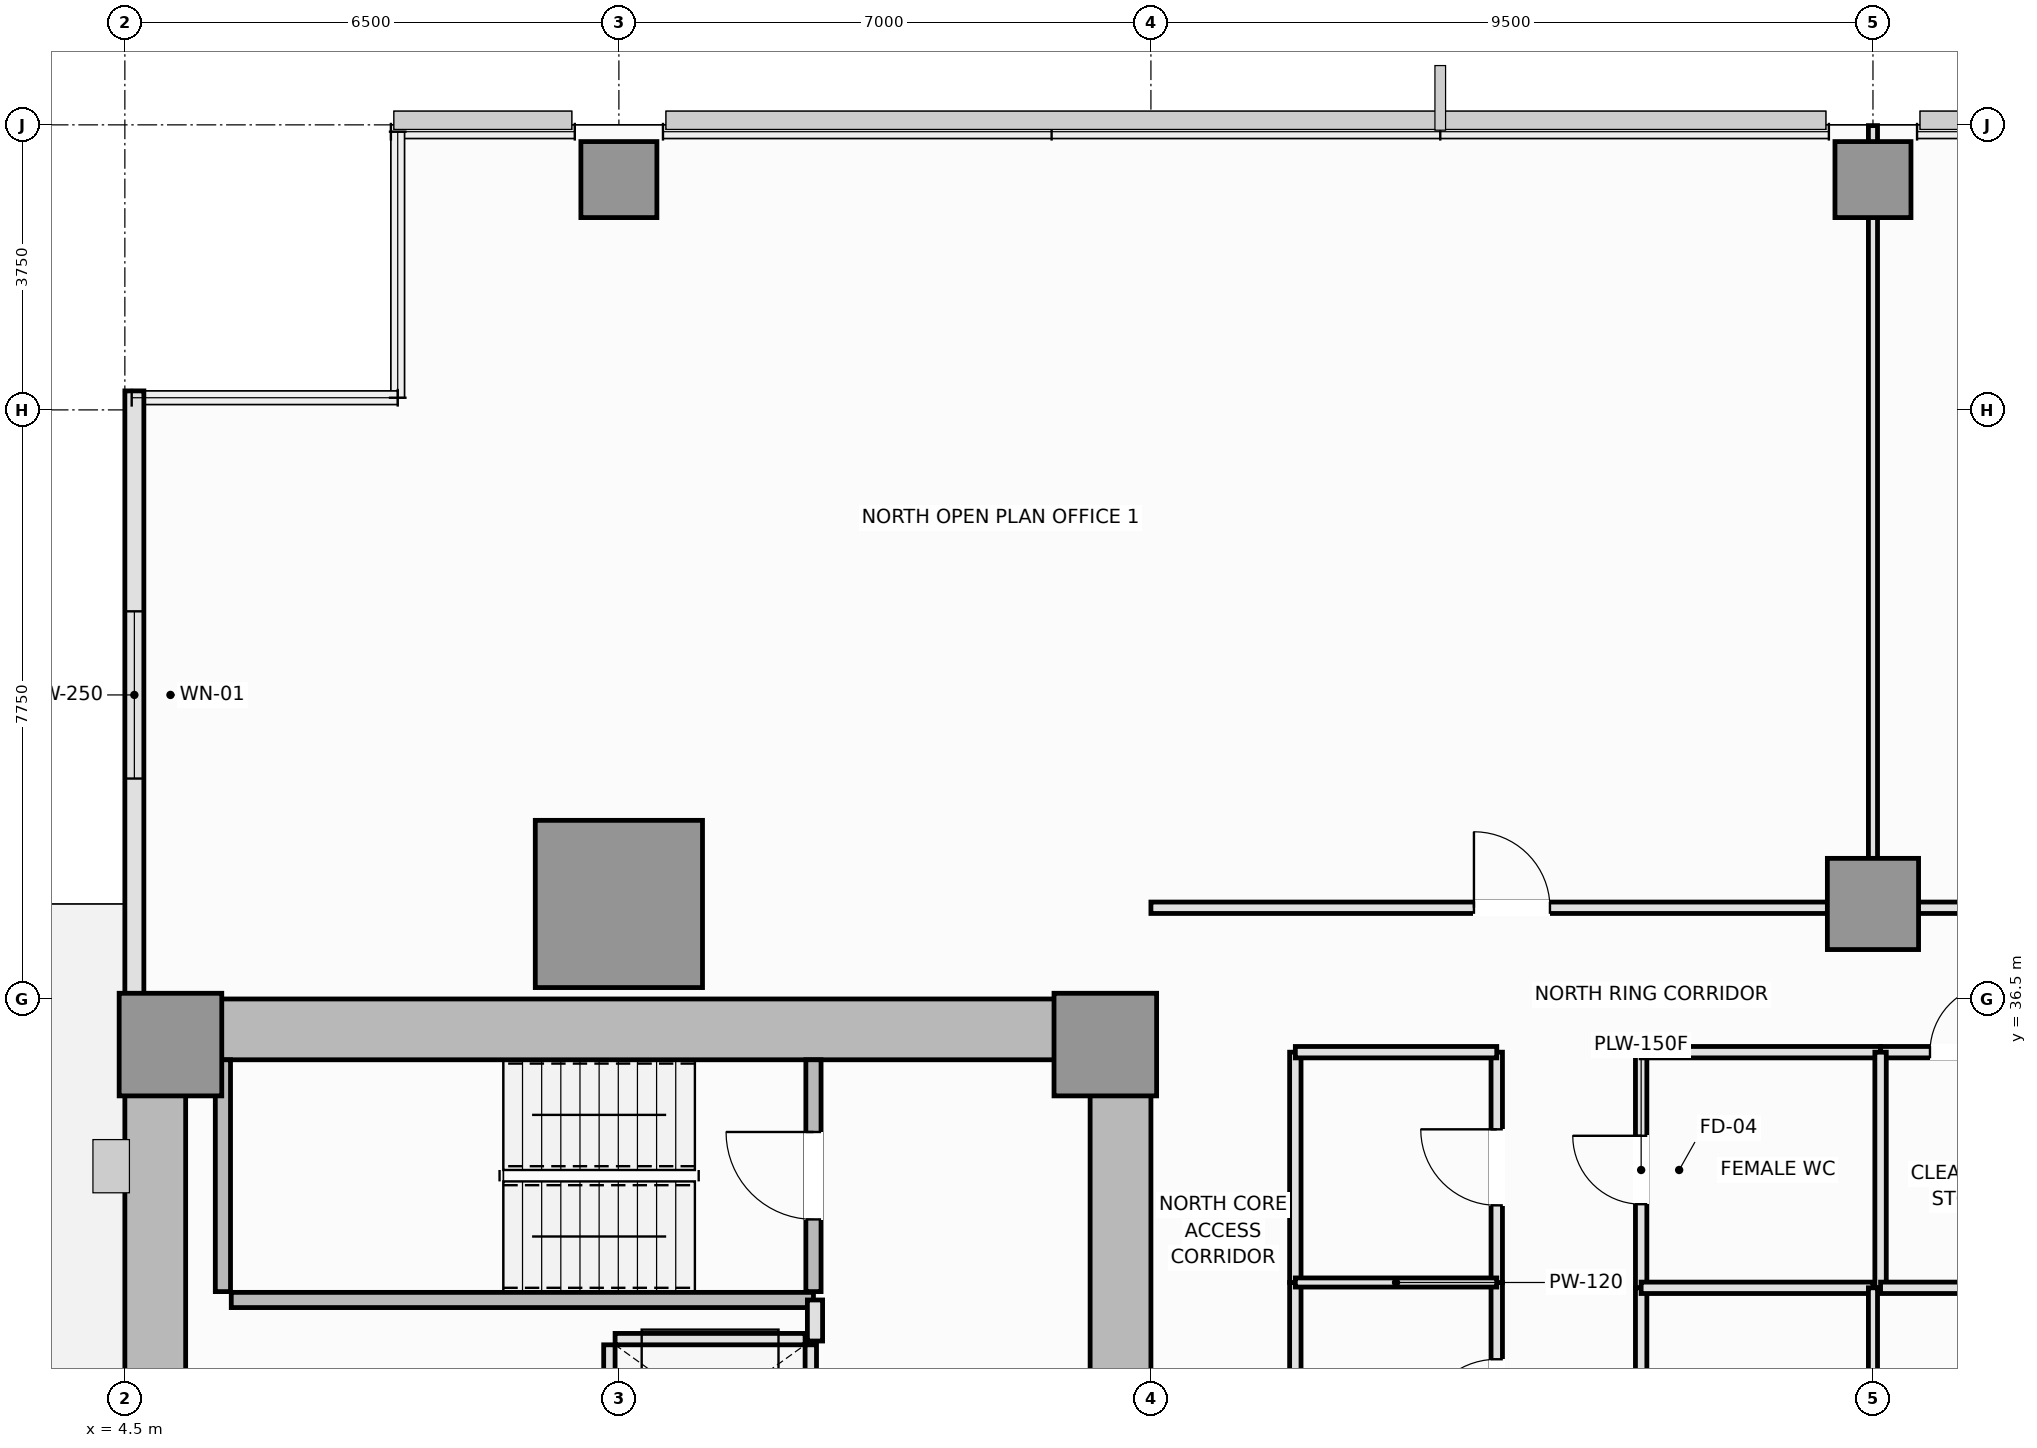
"""IFC4 building model, lengths in metres.
Left out: names, types, materials, properties, quantities, classifications, styles, units other than length and angle.
Written with IfcOpenShell. Run it as: python <this file> out.ifc"""

import sys

from ifc_helpers import new_model, si_unit, direction, frame, frame_2d, origin, origin_2d, place, context, subcontext, project, spatial, rectangle, extrude, element, fill, save


model = new_model("IFC4")
c1 = context("Model", 3, precision=1e-05, world=origin(), true_north=direction((0.0, 1.0)))
c2 = subcontext(c1, "Body", "Model", "MODEL_VIEW")
j1 = project(units=[si_unit("LENGTHUNIT", "METRE"), si_unit("PLANEANGLEUNIT", "RADIAN")], contexts=[c1])
p1 = place(None, origin())
s1 = spatial("IfcSite", under=j1, at=p1, CompositionType="ELEMENT")
p2 = place(p1, origin())
s2 = spatial("IfcBuilding", under=s1, at=p2, CompositionType="ELEMENT")
p3 = place(p2, frame((0.0, 0.0, 25.6)))
s3 = spatial("IfcBuildingStorey", under=s2, at=p3, CompositionType="ELEMENT", Elevation=25.6)
p4 = place(p3, frame((4.5, 36.1, 0.0), z_axis=(0.0, 0.0, 1.0), x_axis=(1.0, 0.0, 0.0)))
e1 = element("IfcWall", 1, at=p4, inside=s3, PredefinedType="SHEAR", context=c2, shape_type="SweptSolid", body=[
    extrude(rectangle(XDim=13.5, YDim=0.8, at=frame_2d((6.75, 0.0))), origin(), (0.0, 0.0, 1.0), 3.55),
])
p5 = place(p3, frame((4.9, 14.8, 0.0), z_axis=(0.0, 0.0, 1.0), x_axis=(0.0, 1.0, 0.0)))
e2 = element("IfcWall", 2, at=p5, inside=s3, PredefinedType="SHEAR", context=c2, shape_type="SweptSolid", body=[
    extrude(rectangle(XDim=20.9, YDim=0.8, at=frame_2d((10.45, 0.0))), origin(), (0.0, 0.0, 1.0), 3.55),
])
p6 = place(p3, frame((17.6, 27.05, 0.0), z_axis=(0.0, 0.0, 1.0), x_axis=(0.0, 1.0, 0.0)))
e3 = element("IfcWall", 3, at=p6, inside=s3, PredefinedType="SHEAR", context=c2, shape_type="SweptSolid", body=[
    extrude(rectangle(XDim=8.65, YDim=0.8, at=frame_2d((4.325, 0.0))), origin(), (0.0, 0.0, 1.0), 3.55),
])
p7 = place(p6, frame((3.45, 0.0, 0.0)))
e4 = element("IfcOpeningElement", 4, at=p7, cuts=e3, PredefinedType="OPENING", context=c2, shape_type="SweptSolid", body=[
    extrude(rectangle(XDim=1.1, YDim=2.15, at=frame_2d((0.55, 1.075))), frame((0.0, 0.41, 0.0), z_axis=(0.0, -1.0, 0.0), x_axis=(1.0, 0.0, 0.0)), (0.0, 0.0, 1.0), 0.82),
])
for number, where, z_axis, x_axis in (
    (5, (5.1, 35.9, 0.0), (0.0, 0.0, 1.0), (1.0, 0.0, 0.0)),
    (6, (17.4, 35.9, 0.0), (0.0, 0.0, 1.0), (1.0, 0.0, 0.0)),
):
    element("IfcColumn", number, at=place(p3, frame(where, z_axis=z_axis, x_axis=x_axis)), inside=s3, PredefinedType="PILASTER", context=c2, shape_type="SweptSolid", body=[
        extrude(rectangle(XDim=1.35, YDim=1.35, at=origin_2d()), origin(), (0.0, 0.0, 1.0), 3.55),
    ])
p8 = place(p3, frame((11.0, 37.75, 0.0), z_axis=(0.0, 0.0, 1.0), x_axis=(1.0, 0.0, 0.0)))
e7 = element("IfcColumn", 7, at=p8, inside=s3, PredefinedType="COLUMN", context=c2, shape_type="SweptSolid", body=[
    extrude(rectangle(XDim=2.2, YDim=2.2, at=origin_2d()), origin(), (0.0, 0.0, 1.0), 3.55),
])
p9 = place(p3, frame((27.5, 37.75, 0.0), z_axis=(0.0, 0.0, 1.0), x_axis=(1.0, 0.0, 0.0)))
e8 = element("IfcColumn", 8, at=p9, inside=s3, PredefinedType="COLUMN", context=c2, shape_type="SweptSolid", body=[
    extrude(rectangle(XDim=1.2, YDim=1.2, at=origin_2d()), origin(), (0.0, 0.0, 1.0), 3.55),
])
for number, where, z_axis, x_axis in (
    (9, (11.0, 47.28, 0.0), (0.0, 0.0, 1.0), (1.0, 0.0, 0.0)),
    (10, (27.5, 47.28, 0.0), (0.0, 0.0, 1.0), (1.0, 0.0, 0.0)),
):
    element("IfcColumn", number, at=place(p3, frame(where, z_axis=z_axis, x_axis=x_axis)), inside=s3, PredefinedType="COLUMN", context=c2, shape_type="SweptSolid", body=[
        extrude(rectangle(XDim=1.0, YDim=1.0, at=origin_2d()), origin(), (0.0, 0.0, 1.0), 3.55),
    ])
p10 = place(p3, frame((4.625, 44.5, 0.0), z_axis=(0.0, 0.0, 1.0), x_axis=(0.0, -1.0, 0.0)))
e11 = element("IfcWall", 11, at=p10, inside=s3, PredefinedType="SOLIDWALL", context=c2, shape_type="SweptSolid", body=[
    extrude(rectangle(XDim=8.0, YDim=0.25, at=frame_2d((4.0, 0.0))), origin(), (0.0, 0.0, 1.0), 3.37),
])
p11 = place(p10, frame((2.9, 0.0, 0.9)))
e12 = element("IfcOpeningElement", 12, at=p11, cuts=e11, PredefinedType="OPENING", context=c2, shape_type="SweptSolid", body=[
    extrude(rectangle(XDim=2.2, YDim=1.8, at=frame_2d((1.1, 0.9))), frame((0.0, 0.135, 0.0), z_axis=(0.0, -1.0, 0.0), x_axis=(1.0, 0.0, 0.0)), (0.0, 0.0, 1.0), 0.27),
])
p12 = place(p3, frame((5.79, 32.65, 0.0), z_axis=(0.0, 0.0, 1.0), x_axis=(0.0, 1.0, 0.0)))
e13 = element("IfcWall", 13, at=p12, inside=s3, PredefinedType="SOLIDWALL", context=c2, shape_type="SweptSolid", body=[
    extrude(rectangle(XDim=3.05, YDim=0.2, at=frame_2d((1.525, 0.0))), origin(), (0.0, 0.0, 1.0), 3.55),
])
p13 = place(p3, frame((5.9, 32.54, 0.0), z_axis=(0.0, 0.0, 1.0), x_axis=(1.0, 0.0, 0.0)))
e14 = element("IfcWall", 14, at=p13, inside=s3, PredefinedType="SOLIDWALL", context=c2, shape_type="SweptSolid", body=[
    extrude(rectangle(XDim=7.66, YDim=0.2, at=frame_2d((3.83, 0.0))), origin(), (0.0, 0.0, 1.0), 3.55),
])
p14 = place(p3, frame((13.56, 32.65, 0.0), z_axis=(0.0, 0.0, 1.0), x_axis=(0.0, 1.0, 0.0)))
e15 = element("IfcWall", 15, at=p14, inside=s3, PredefinedType="SOLIDWALL", context=c2, shape_type="SweptSolid", body=[
    extrude(rectangle(XDim=3.05, YDim=0.2, at=frame_2d((1.525, 0.0))), origin(), (0.0, 0.0, 1.0), 3.55),
])
p15 = place(p14, frame((0.95, 0.0, 0.0)))
e16 = element("IfcOpeningElement", 16, at=p15, cuts=e15, PredefinedType="OPENING", context=c2, shape_type="SweptSolid", body=[
    extrude(rectangle(XDim=1.15, YDim=2.15, at=frame_2d((0.575, 1.075))), frame((0.0, 0.11, 0.0), z_axis=(0.0, -1.0, 0.0), x_axis=(1.0, 0.0, 0.0)), (0.0, 0.0, 1.0), 0.22),
])
p16 = place(p3, frame((10.95, 32.025, 0.0), z_axis=(0.0, 0.0, 1.0), x_axis=(1.0, 0.0, 0.0)))
e17 = element("IfcWall", 17, at=p16, inside=s3, PredefinedType="PARTITIONING", context=c2, shape_type="SweptSolid", body=[
    extrude(rectangle(XDim=2.5, YDim=0.15, at=frame_2d((1.25, 0.0))), origin(), (0.0, 0.0, 1.0), 3.37),
])
p17 = place(p3, frame((10.875, 30.15, 0.0), z_axis=(0.0, 0.0, 1.0), x_axis=(0.0, 1.0, 0.0)))
e18 = element("IfcWall", 18, at=p17, inside=s3, PredefinedType="PARTITIONING", context=c2, shape_type="SweptSolid", body=[
    extrude(rectangle(XDim=1.8, YDim=0.15, at=frame_2d((0.9, 0.0))), origin(), (0.0, 0.0, 1.0), 3.37),
])
p18 = place(p3, frame((13.525, 30.15, 0.0), z_axis=(0.0, 0.0, 1.0), x_axis=(0.0, 1.0, 0.0)))
e19 = element("IfcWall", 19, at=p18, inside=s3, PredefinedType="PARTITIONING", context=c2, shape_type="SweptSolid", body=[
    extrude(rectangle(XDim=1.8, YDim=0.15, at=frame_2d((0.9, 0.0))), origin(), (0.0, 0.0, 1.0), 3.37),
])
p19 = place(p18, frame((0.35, 0.0, 0.0)))
e20 = element("IfcOpeningElement", 20, at=p19, cuts=e19, PredefinedType="OPENING", context=c2, shape_type="SweptSolid", body=[
    extrude(rectangle(XDim=1.1, YDim=2.2, at=frame_2d((0.55, 1.1))), frame((0.0, 0.085, 0.0), z_axis=(0.0, -1.0, 0.0), x_axis=(1.0, 0.0, 0.0)), (0.0, 0.0, 1.0), 0.17),
])
p20 = place(p3, frame((13.58, 32.0, 0.0), z_axis=(0.0, 0.0, 1.0), x_axis=(0.0, 1.0, 0.0)))
e21 = element("IfcWall", 21, at=p20, inside=s3, PredefinedType="PARTITIONING", context=c2, shape_type="SweptSolid", body=[
    extrude(rectangle(XDim=0.54, YDim=0.2, at=frame_2d((0.27, 0.0))), origin(), (0.0, 0.0, 1.0), 3.37),
])
p21 = place(p3, frame((22.55, 29.75, 0.0), z_axis=(0.0, 0.0, 1.0), x_axis=(0.0, 1.0, 0.0)))
e22 = element("IfcWall", 22, at=p21, inside=s3, PredefinedType="PARTITIONING", context=c2, shape_type="SweptSolid", body=[
    extrude(rectangle(XDim=3.02, YDim=0.15, at=frame_2d((1.51, 0.0))), origin(), (0.0, 0.0, 1.0), 3.01),
])
p22 = place(p21, frame((1.01, 0.0, 0.0)))
e23 = element("IfcOpeningElement", 23, at=p22, cuts=e22, PredefinedType="OPENING", context=c2, shape_type="SweptSolid", body=[
    extrude(rectangle(XDim=1.0, YDim=2.15, at=frame_2d((0.5, 1.075))), frame((0.0, 0.085, 0.0), z_axis=(0.0, -1.0, 0.0), x_axis=(1.0, 0.0, 0.0)), (0.0, 0.0, 1.0), 0.17),
])
p23 = place(p3, frame((22.55, 32.77, 0.0), z_axis=(0.0, 0.0, 1.0), x_axis=(0.0, 1.0, 0.0)))
e24 = element("IfcWall", 24, at=p23, inside=s3, PredefinedType="PARTITIONING", context=c2, shape_type="SweptSolid", body=[
    extrude(rectangle(XDim=3.03, YDim=0.15, at=frame_2d((1.515, 0.0))), origin(), (0.0, 0.0, 1.0), 3.01),
])
p24 = place(p23, frame((1.015, 0.0, 0.0)))
e25 = element("IfcOpeningElement", 25, at=p24, cuts=e24, PredefinedType="OPENING", context=c2, shape_type="SweptSolid", body=[
    extrude(rectangle(XDim=1.0, YDim=2.15, at=frame_2d((0.5, 1.075))), frame((0.0, 0.085, 0.0), z_axis=(0.0, -1.0, 0.0), x_axis=(1.0, 0.0, 0.0)), (0.0, 0.0, 1.0), 0.17),
])
p25 = place(p3, frame((24.45, 32.7, 0.0), z_axis=(0.0, 0.0, 1.0), x_axis=(0.0, 1.0, 0.0)))
e26 = element("IfcWall", 26, at=p25, inside=s3, PredefinedType="PLUMBINGWALL", context=c2, shape_type="SweptSolid", body=[
    extrude(rectangle(XDim=3.1, YDim=0.15, at=frame_2d((1.55, 0.0))), origin(), (0.0, 0.0, 1.0), 3.37),
])
p26 = place(p25, frame((1.1, 0.0, 0.0)))
e27 = element("IfcOpeningElement", 27, at=p26, cuts=e26, PredefinedType="OPENING", context=c2, shape_type="SweptSolid", body=[
    extrude(rectangle(XDim=0.9, YDim=2.1, at=frame_2d((0.45, 1.05))), frame((0.0, 0.085, 0.0), z_axis=(0.0, -1.0, 0.0), x_axis=(1.0, 0.0, 0.0)), (0.0, 0.0, 1.0), 0.17),
])
p27 = place(p3, frame((24.45, 17.8, 0.0), z_axis=(0.0, 0.0, 1.0), x_axis=(0.0, 1.0, 0.0)))
e28 = element("IfcWall", 28, at=p27, inside=s3, PredefinedType="PARTITIONING", context=c2, shape_type="SweptSolid", body=[
    extrude(rectangle(XDim=14.9, YDim=0.15, at=frame_2d((7.45, 0.0))), origin(), (0.0, 0.0, 1.0), 3.37),
])
p28 = place(p27, frame((6.95, 0.0, 0.0)))
e29 = element("IfcOpeningElement", 29, at=p28, cuts=e28, PredefinedType="OPENING", context=c2, shape_type="SweptSolid", body=[
    extrude(rectangle(XDim=1.0, YDim=2.15, at=frame_2d((0.5, 1.075))), frame((0.0, 0.085, 0.0), z_axis=(0.0, -1.0, 0.0), x_axis=(1.0, 0.0, 0.0)), (0.0, 0.0, 1.0), 0.17),
])
p29 = place(p3, frame((19.9, 29.75, 0.0), z_axis=(0.0, 0.0, 1.0), x_axis=(0.0, 1.0, 0.0)))
e30 = element("IfcWall", 30, at=p29, inside=s3, PredefinedType="PARTITIONING", context=c2, shape_type="SweptSolid", body=[
    extrude(rectangle(XDim=3.02, YDim=0.15, at=frame_2d((1.51, 0.0))), origin(), (0.0, 0.0, 1.0), 3.37),
])
p30 = place(p3, frame((19.9, 32.77, 0.0), z_axis=(0.0, 0.0, 1.0), x_axis=(0.0, 1.0, 0.0)))
e31 = element("IfcWall", 31, at=p30, inside=s3, PredefinedType="PARTITIONING", context=c2, shape_type="SweptSolid", body=[
    extrude(rectangle(XDim=3.03, YDim=0.15, at=frame_2d((1.515, 0.0))), origin(), (0.0, 0.0, 1.0), 3.37),
])
p31 = place(p3, frame((19.9, 35.8, 0.0), z_axis=(0.0, 0.0, 1.0), x_axis=(1.0, 0.0, 0.0)))
e32 = element("IfcWall", 32, at=p31, inside=s3, PredefinedType="PARTITIONING", context=c2, shape_type="SweptSolid", body=[
    extrude(rectangle(XDim=2.65, YDim=0.15, at=frame_2d((1.325, 0.0))), origin(), (0.0, 0.0, 1.0), 3.37),
])
p32 = place(p3, frame((24.45, 35.8, 0.0), z_axis=(0.0, 0.0, 1.0), x_axis=(1.0, 0.0, 0.0)))
e33 = element("IfcWall", 33, at=p32, inside=s3, PredefinedType="PLUMBINGWALL", context=c2, shape_type="SweptSolid", body=[
    extrude(rectangle(XDim=3.15, YDim=0.15, at=frame_2d((1.575, 0.0))), origin(), (0.0, 0.0, 1.0), 3.37),
])
p33 = place(p3, frame((27.6, 35.8, 0.0), z_axis=(0.0, 0.0, 1.0), x_axis=(1.0, 0.0, 0.0)))
e34 = element("IfcWall", 34, at=p33, inside=s3, PredefinedType="PLUMBINGWALL", context=c2, shape_type="SweptSolid", body=[
    extrude(rectangle(XDim=2.2, YDim=0.15, at=frame_2d((1.1, 0.0))), origin(), (0.0, 0.0, 1.0), 3.37),
])
p34 = place(p33, frame((0.65, 0.0, 0.0)))
e35 = element("IfcOpeningElement", 35, at=p34, cuts=e34, PredefinedType="OPENING", context=c2, shape_type="SweptSolid", body=[
    extrude(rectangle(XDim=0.9, YDim=2.1, at=frame_2d((0.45, 1.05))), frame((0.0, 0.085, 0.0), z_axis=(0.0, -1.0, 0.0), x_axis=(1.0, 0.0, 0.0)), (0.0, 0.0, 1.0), 0.17),
])
p35 = place(p3, frame((18.0, 37.7, 0.0), z_axis=(0.0, 0.0, 1.0), x_axis=(1.0, 0.0, 0.0)))
e36 = element("IfcWall", 36, at=p35, inside=s3, PredefinedType="PARTITIONING", context=c2, shape_type="SweptSolid", body=[
    extrude(rectangle(XDim=9.5, YDim=0.15, at=frame_2d((4.75, 0.0))), origin(), (0.0, 0.0, 1.0), 2.72),
])
p36 = place(p35, frame((4.25, 0.0, 0.0)))
e37 = element("IfcOpeningElement", 37, at=p36, cuts=e36, PredefinedType="OPENING", context=c2, shape_type="SweptSolid", body=[
    extrude(rectangle(XDim=1.0, YDim=2.15, at=frame_2d((0.5, 1.075))), frame((0.0, 0.085, 0.0), z_axis=(0.0, -1.0, 0.0), x_axis=(1.0, 0.0, 0.0)), (0.0, 0.0, 1.0), 0.17),
])
p37 = place(p3, frame((27.5, 37.7, 0.0), z_axis=(0.0, 0.0, 1.0), x_axis=(1.0, 0.0, 0.0)))
e38 = element("IfcWall", 38, at=p37, inside=s3, PredefinedType="PARTITIONING", context=c2, shape_type="SweptSolid", body=[
    extrude(rectangle(XDim=10.7, YDim=0.15, at=frame_2d((5.35, 0.0))), origin(), (0.0, 0.0, 1.0), 2.72),
])
p38 = place(p37, frame((4.85, 0.0, 0.0)))
e39 = element("IfcOpeningElement", 39, at=p38, cuts=e38, PredefinedType="OPENING", context=c2, shape_type="SweptSolid", body=[
    extrude(rectangle(XDim=1.0, YDim=2.15, at=frame_2d((0.5, 1.075))), frame((0.0, 0.085, 0.0), z_axis=(0.0, -1.0, 0.0), x_axis=(1.0, 0.0, 0.0)), (0.0, 0.0, 1.0), 0.17),
])
p39 = place(p3, frame((19.9, 32.77, 0.0), z_axis=(0.0, 0.0, 1.0), x_axis=(1.0, 0.0, 0.0)))
e40 = element("IfcWall", 40, at=p39, inside=s3, PredefinedType="PARTITIONING", context=c2, shape_type="SweptSolid", body=[
    extrude(rectangle(XDim=2.65, YDim=0.12, at=frame_2d((1.325, 0.0))), origin(), (0.0, 0.0, 1.0), 3.37),
])
p40 = place(p3, frame((27.6, 32.7, 0.0), z_axis=(0.0, 0.0, 1.0), x_axis=(0.0, 1.0, 0.0)))
e41 = element("IfcWall", 41, at=p40, inside=s3, PredefinedType="PLUMBINGWALL", context=c2, shape_type="SweptSolid", body=[
    extrude(rectangle(XDim=3.1, YDim=0.15, at=frame_2d((1.55, 0.0))), origin(), (0.0, 0.0, 1.0), 3.37),
])
p41 = place(p3, frame((24.45, 32.7, 0.0), z_axis=(0.0, 0.0, 1.0), x_axis=(1.0, 0.0, 0.0)))
e42 = element("IfcWall", 42, at=p41, inside=s3, PredefinedType="PLUMBINGWALL", context=c2, shape_type="SweptSolid", body=[
    extrude(rectangle(XDim=3.05, YDim=0.15, at=frame_2d((1.525, 0.0))), origin(), (0.0, 0.0, 1.0), 3.37),
])
p42 = place(p3, frame((27.6, 32.7, 0.0), z_axis=(0.0, 0.0, 1.0), x_axis=(1.0, 0.0, 0.0)))
e43 = element("IfcWall", 43, at=p42, inside=s3, PredefinedType="PLUMBINGWALL", context=c2, shape_type="SweptSolid", body=[
    extrude(rectangle(XDim=2.2, YDim=0.15, at=frame_2d((1.1, 0.0))), origin(), (0.0, 0.0, 1.0), 3.37),
])
p43 = place(p3, frame((27.5, 17.8, 0.0), z_axis=(0.0, 0.0, 1.0), x_axis=(0.0, 1.0, 0.0)))
e44 = element("IfcWall", 44, at=p43, inside=s3, PredefinedType="PARTITIONING", context=c2, shape_type="SweptSolid", body=[
    extrude(rectangle(XDim=14.9, YDim=0.12, at=frame_2d((7.45, 0.0))), origin(), (0.0, 0.0, 1.0), 3.37),
])
p44 = place(p3, frame((27.5, 37.7, 0.0), z_axis=(0.0, 0.0, 1.0), x_axis=(0.0, 1.0, 0.0)))
e45 = element("IfcWall", 45, at=p44, inside=s3, PredefinedType="PARTITIONING", context=c2, shape_type="SweptSolid", body=[
    extrude(rectangle(XDim=10.29, YDim=0.12, at=frame_2d((5.145, 0.0))), origin(), (0.0, 0.0, 1.0), 2.82),
])
p45 = place(p11, origin())
e46 = element("IfcWindow", 46, at=p45, inside=s3, PartitioningType="SINGLE_PANEL", PredefinedType="WINDOW", context=c2, shape_type="SweptSolid", body=[
    extrude(rectangle(XDim=2.2, YDim=1.8, at=frame_2d((1.1, 0.9))), frame((0.0, 0.03, 0.0), z_axis=(0.0, -1.0, 0.0), x_axis=(1.0, 0.0, 0.0)), (0.0, 0.0, 1.0), 0.06),
])
fill(e12, e46)
p46 = place(p15, origin())
e47 = element("IfcDoor", 47, at=p46, inside=s3, OperationType="SINGLE_SWING_RIGHT", PredefinedType="DOOR", context=c2, shape_type="SweptSolid", body=[
    extrude(rectangle(XDim=1.15, YDim=2.15, at=frame_2d((0.575, 1.075))), frame((0.0, 0.025, 0.0), z_axis=(0.0, -1.0, 0.0), x_axis=(1.0, 0.0, 0.0)), (0.0, 0.0, 1.0), 0.05),
])
fill(e16, e47)
p47 = place(p22, origin())
e48 = element("IfcDoor", 48, at=p47, inside=s3, OperationType="SINGLE_SWING_LEFT", PredefinedType="DOOR", context=c2, shape_type="SweptSolid", body=[
    extrude(rectangle(XDim=1.0, YDim=2.15, at=frame_2d((0.5, 1.075))), frame((0.0, 0.025, 0.0), z_axis=(0.0, -1.0, 0.0), x_axis=(1.0, 0.0, 0.0)), (0.0, 0.0, 1.0), 0.05),
])
fill(e23, e48)
p48 = place(p24, origin())
e49 = element("IfcDoor", 49, at=p48, inside=s3, OperationType="SINGLE_SWING_RIGHT", PredefinedType="DOOR", context=c2, shape_type="SweptSolid", body=[
    extrude(rectangle(XDim=1.0, YDim=2.15, at=frame_2d((0.5, 1.075))), frame((0.0, 0.025, 0.0), z_axis=(0.0, -1.0, 0.0), x_axis=(1.0, 0.0, 0.0)), (0.0, 0.0, 1.0), 0.05),
])
fill(e25, e49)
p49 = place(p26, origin())
e50 = element("IfcDoor", 50, at=p49, inside=s3, OperationType="SINGLE_SWING_RIGHT", PredefinedType="DOOR", context=c2, shape_type="SweptSolid", body=[
    extrude(rectangle(XDim=0.9, YDim=2.1, at=frame_2d((0.45, 1.05))), frame((0.0, 0.025, 0.0), z_axis=(0.0, -1.0, 0.0), x_axis=(1.0, 0.0, 0.0)), (0.0, 0.0, 1.0), 0.05),
])
fill(e27, e50)
p50 = place(p34, origin())
e51 = element("IfcDoor", 51, at=p50, inside=s3, OperationType="SINGLE_SWING_RIGHT", PredefinedType="DOOR", context=c2, shape_type="SweptSolid", body=[
    extrude(rectangle(XDim=0.9, YDim=2.1, at=frame_2d((0.45, 1.05))), frame((0.0, 0.025, 0.0), z_axis=(0.0, -1.0, 0.0), x_axis=(1.0, 0.0, 0.0)), (0.0, 0.0, 1.0), 0.05),
])
fill(e35, e51)
p51 = place(p36, origin())
e52 = element("IfcDoor", 52, at=p51, inside=s3, OperationType="SINGLE_SWING_LEFT", PredefinedType="DOOR", context=c2, shape_type="SweptSolid", body=[
    extrude(rectangle(XDim=1.0, YDim=2.15, at=frame_2d((0.5, 1.075))), frame((0.0, 0.025, 0.0), z_axis=(0.0, -1.0, 0.0), x_axis=(1.0, 0.0, 0.0)), (0.0, 0.0, 1.0), 0.05),
])
fill(e37, e52)
save(model, sys.argv[1])
